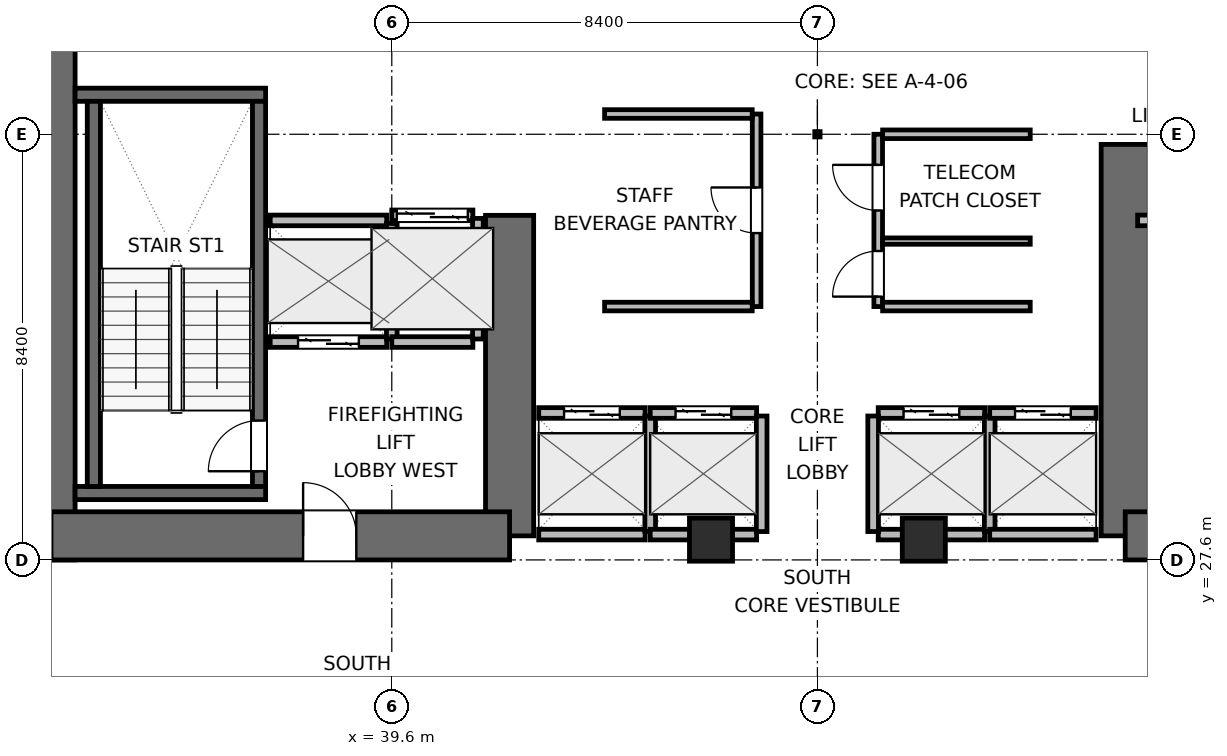
"""IFC4 building model, lengths in metres.
Left out: names, types, materials, properties, quantities, classifications, styles, units other than length and angle.
Written with IfcOpenShell. Run it as: python <this file> out.ifc"""

import sys

from ifc_helpers import new_model, si_unit, direction, frame, frame_2d, origin, origin_2d, place, context, subcontext, project, spatial, rectangle, extrude, element, fill, save


model = new_model("IFC4")
c1 = context("Model", 3, precision=1e-05, world=origin(), true_north=direction((0.0, 1.0)))
c2 = subcontext(c1, "Body", "Model", "MODEL_VIEW")
j1 = project(units=[si_unit("LENGTHUNIT", "METRE"), si_unit("PLANEANGLEUNIT", "RADIAN")], contexts=[c1])
p1 = place(None, origin())
s1 = spatial("IfcSite", under=j1, at=p1, CompositionType="ELEMENT")
p2 = place(p1, origin())
s2 = spatial("IfcBuilding", under=s1, at=p2, CompositionType="ELEMENT")
p3 = place(p2, frame((0.0, 0.0, 85.8)))
s3 = spatial("IfcBuildingStorey", under=s2, at=p3, CompositionType="ELEMENT", Elevation=85.8)
p4 = place(p3, frame((32.875, 27.6, 0.0), z_axis=(0.0, 0.0, 1.0), x_axis=(0.0, 1.0, 0.0)))
e1 = element("IfcWall", 1, at=p4, inside=s3, PredefinedType="SHEAR", context=c2, shape_type="SweptSolid", body=[
    extrude(rectangle(XDim=16.8, YDim=0.95, at=frame_2d((8.4, 0.0))), origin(), (0.0, 0.0, 1.0), 3.9),
])
p5 = place(p3, frame((41.925, 28.075, 0.0), z_axis=(0.0, 0.0, 1.0), x_axis=(0.0, 1.0, 0.0)))
e2 = element("IfcWall", 2, at=p5, inside=s3, PredefinedType="SHEAR", context=c2, shape_type="SweptSolid", body=[
    extrude(rectangle(XDim=6.325, YDim=0.95, at=frame_2d((3.163, 0.0))), origin(), (0.0, 0.0, 1.0), 3.9),
])
p6 = place(p3, frame((32.875, 28.075, 0.0), z_axis=(0.0, 0.0, 1.0), x_axis=(1.0, 0.0, 0.0)))
e3 = element("IfcWall", 3, at=p6, inside=s3, PredefinedType="SHEAR", context=c2, shape_type="SweptSolid", body=[
    extrude(rectangle(XDim=9.05, YDim=0.95, at=frame_2d((4.525, 0.0))), origin(), (0.0, 0.0, 1.0), 3.9),
])
p7 = place(p6, frame((4.975, 0.0, 0.0)))
e4 = element("IfcOpeningElement", 4, at=p7, cuts=e3, PredefinedType="OPENING", context=c2, shape_type="SweptSolid", body=[
    extrude(rectangle(XDim=1.05, YDim=2.04, at=frame_2d((0.525, 1.02))), frame((0.0, 0.485, 0.0), z_axis=(0.0, -1.0, 0.0), x_axis=(1.0, 0.0, 0.0)), (0.0, 0.0, 1.0), 0.97),
])
p8 = place(p3, frame((54.075, 28.075, 0.0), z_axis=(0.0, 0.0, 1.0), x_axis=(0.0, 1.0, 0.0)))
e5 = element("IfcWall", 5, at=p8, inside=s3, PredefinedType="SHEAR", context=c2, shape_type="SweptSolid", body=[
    extrude(rectangle(XDim=7.725, YDim=0.95, at=frame_2d((3.863, 0.0))), origin(), (0.0, 0.0, 1.0), 3.9),
])
p9 = place(p3, frame((54.075, 28.075, 0.0), z_axis=(0.0, 0.0, 1.0), x_axis=(1.0, 0.0, 0.0)))
e6 = element("IfcWall", 6, at=p9, inside=s3, PredefinedType="SHEAR", context=c2, shape_type="SweptSolid", body=[
    extrude(rectangle(XDim=9.05, YDim=0.95, at=frame_2d((4.525, 0.0))), origin(), (0.0, 0.0, 1.0), 3.9),
])
p10 = place(p9, frame((3.925, 0.0, 0.0)))
e7 = element("IfcOpeningElement", 7, at=p10, cuts=e6, PredefinedType="OPENING", context=c2, shape_type="SweptSolid", body=[
    extrude(rectangle(XDim=1.05, YDim=2.04, at=frame_2d((0.525, 1.02))), frame((0.0, 0.485, 0.0), z_axis=(0.0, -1.0, 0.0), x_axis=(1.0, 0.0, 0.0)), (0.0, 0.0, 1.0), 0.97),
])
for number, where, z_axis, x_axis in (
    (8, (33.35, 28.92, 0.0), (0.0, 0.0, 1.0), (1.0, 0.0, 0.0)),
    (9, (33.35, 36.78, 0.0), (0.0, 0.0, 1.0), (1.0, 0.0, 0.0)),
):
    element("IfcWall", number, at=place(p3, frame(where, z_axis=z_axis, x_axis=x_axis)), inside=s3, PredefinedType="SHEAR", context=c2, shape_type="SweptSolid", body=[
        extrude(rectangle(XDim=3.76, YDim=0.26, at=frame_2d((1.88, 0.0))), origin(), (0.0, 0.0, 1.0), 3.9),
    ])
p11 = place(p3, frame((33.72, 29.05, 0.0), z_axis=(0.0, 0.0, 1.0), x_axis=(0.0, 1.0, 0.0)))
e10 = element("IfcWall", 10, at=p11, inside=s3, PredefinedType="SHEAR", context=c2, shape_type="SweptSolid", body=[
    extrude(rectangle(XDim=7.6, YDim=0.26, at=frame_2d((3.8, 0.0))), origin(), (0.0, 0.0, 1.0), 3.9),
])
p12 = place(p3, frame((36.98, 29.05, 0.0), z_axis=(0.0, 0.0, 1.0), x_axis=(0.0, 1.0, 0.0)))
e11 = element("IfcWall", 11, at=p12, inside=s3, PredefinedType="SHEAR", context=c2, shape_type="SweptSolid", body=[
    extrude(rectangle(XDim=7.6, YDim=0.26, at=frame_2d((3.8, 0.0))), origin(), (0.0, 0.0, 1.0), 3.9),
])
p13 = place(p12, frame((0.3, 0.0, 0.0)))
e12 = element("IfcOpeningElement", 12, at=p13, cuts=e11, PredefinedType="OPENING", context=c2, shape_type="SweptSolid", body=[
    extrude(rectangle(XDim=1.0, YDim=2.04, at=frame_2d((0.5, 1.02))), frame((0.0, 0.14, 0.0), z_axis=(0.0, -1.0, 0.0), x_axis=(1.0, 0.0, 0.0)), (0.0, 0.0, 1.0), 0.28),
])
for number, where, z_axis, x_axis in (
    (13, (45.9, 28.0, 0.0), (0.0, 0.0, 1.0), (1.0, 0.0, 0.0)),
    (14, (50.1, 28.0, 0.0), (0.0, 0.0, 1.0), (1.0, 0.0, 0.0)),
):
    element("IfcColumn", number, at=place(p3, frame(where, z_axis=z_axis, x_axis=x_axis)), inside=s3, PredefinedType="COLUMN", context=c2, shape_type="SweptSolid", body=[
        extrude(rectangle(XDim=0.85, YDim=0.85, at=origin_2d()), origin(), (0.0, 0.0, 1.0), 3.9),
    ])
p14 = place(p3, frame((37.2, 31.9, 0.0), z_axis=(0.0, 0.0, 1.0), x_axis=(1.0, 0.0, 0.0)))
e15 = element("IfcWall", 15, at=p14, inside=s3, PredefinedType="PARTITIONING", context=c2, shape_type="SweptSolid", body=[
    extrude(rectangle(XDim=2.3, YDim=0.21, at=frame_2d((1.15, 0.0))), origin(), (0.0, 0.0, 1.0), 3.64),
])
p15 = place(p14, frame((0.55, 0.0, 0.0)))
e16 = element("IfcOpeningElement", 16, at=p15, cuts=e15, PredefinedType="OPENING", context=c2, shape_type="SweptSolid", body=[
    extrude(rectangle(XDim=1.2, YDim=2.04, at=frame_2d((0.6, 1.02))), frame((0.0, 0.115, 0.0), z_axis=(0.0, -1.0, 0.0), x_axis=(1.0, 0.0, 0.0)), (0.0, 0.0, 1.0), 0.23),
])
p16 = place(p3, frame((37.2, 34.3, 0.0), z_axis=(0.0, 0.0, 1.0), x_axis=(1.0, 0.0, 0.0)))
e17 = element("IfcWall", 17, at=p16, inside=s3, PredefinedType="PARTITIONING", context=c2, shape_type="SweptSolid", body=[
    extrude(rectangle(XDim=2.3, YDim=0.21, at=frame_2d((1.15, 0.0))), origin(), (0.0, 0.0, 1.0), 3.64),
])
p17 = place(p3, frame((39.6, 31.96, 0.0), z_axis=(0.0, 0.0, 1.0), x_axis=(0.0, 1.0, 0.0)))
e18 = element("IfcWall", 18, at=p17, inside=s3, PredefinedType="PARTITIONING", context=c2, shape_type="SweptSolid", body=[
    extrude(rectangle(XDim=2.28, YDim=0.21, at=frame_2d((1.14, 0.0))), origin(), (0.0, 0.0, 1.0), 3.64),
])
p18 = place(p3, frame((54.32, 34.3, 0.0), z_axis=(0.0, 0.0, 1.0), x_axis=(1.0, 0.0, 0.0)))
e19 = element("IfcWall", 19, at=p18, inside=s3, PredefinedType="PARTITIONING", context=c2, shape_type="SweptSolid", body=[
    extrude(rectangle(XDim=3.48, YDim=0.21, at=frame_2d((1.74, 0.0))), origin(), (0.0, 0.0, 1.0), 3.64),
])
p19 = place(p3, frame((39.6, 34.4, 0.0), z_axis=(0.0, 0.0, 1.0), x_axis=(1.0, 0.0, 0.0)))
e20 = element("IfcWall", 20, at=p19, inside=s3, PredefinedType="PARTITIONING", context=c2, shape_type="SweptSolid", body=[
    extrude(rectangle(XDim=1.6, YDim=0.21, at=frame_2d((0.8, 0.0))), origin(), (0.0, 0.0, 1.0), 3.64),
])
p20 = place(p19, frame((0.1, 0.0, 0.0)))
e21 = element("IfcOpeningElement", 21, at=p20, cuts=e20, PredefinedType="OPENING", context=c2, shape_type="SweptSolid", body=[
    extrude(rectangle(XDim=1.4, YDim=2.06, at=frame_2d((0.7, 1.03))), frame((0.0, 0.115, 0.0), z_axis=(0.0, -1.0, 0.0), x_axis=(1.0, 0.0, 0.0)), (0.0, 0.0, 1.0), 0.23),
])
p21 = place(p3, frame((39.6, 31.9, 0.0), z_axis=(0.0, 0.0, 1.0), x_axis=(1.0, 0.0, 0.0)))
e22 = element("IfcWall", 22, at=p21, inside=s3, PredefinedType="PARTITIONING", context=c2, shape_type="SweptSolid", body=[
    extrude(rectangle(XDim=1.6, YDim=0.21, at=frame_2d((0.8, 0.0))), origin(), (0.0, 0.0, 1.0), 3.64),
])
p22 = place(p3, frame((41.3, 31.96, 0.0), z_axis=(0.0, 0.0, 1.0), x_axis=(0.0, 1.0, 0.0)))
e23 = element("IfcWall", 23, at=p22, inside=s3, PredefinedType="PARTITIONING", context=c2, shape_type="SweptSolid", body=[
    extrude(rectangle(XDim=2.38, YDim=0.21, at=frame_2d((1.19, 0.0))), origin(), (0.0, 0.0, 1.0), 3.64),
])
p23 = place(p3, frame((42.5, 30.5, 0.0), z_axis=(0.0, 0.0, 1.0), x_axis=(1.0, 0.0, 0.0)))
e24 = element("IfcWall", 24, at=p23, inside=s3, PredefinedType="PARTITIONING", context=c2, shape_type="SweptSolid", body=[
    extrude(rectangle(XDim=2.1, YDim=0.21, at=frame_2d((1.05, 0.0))), origin(), (0.0, 0.0, 1.0), 3.64),
])
p24 = place(p23, frame((0.5, 0.0, 0.0)))
e25 = element("IfcOpeningElement", 25, at=p24, cuts=e24, PredefinedType="OPENING", context=c2, shape_type="SweptSolid", body=[
    extrude(rectangle(XDim=1.1, YDim=2.04, at=frame_2d((0.55, 1.02))), frame((0.0, 0.115, 0.0), z_axis=(0.0, -1.0, 0.0), x_axis=(1.0, 0.0, 0.0)), (0.0, 0.0, 1.0), 0.23),
])
p25 = place(p3, frame((42.5, 28.1, 0.0), z_axis=(0.0, 0.0, 1.0), x_axis=(1.0, 0.0, 0.0)))
e26 = element("IfcWall", 26, at=p25, inside=s3, PredefinedType="PARTITIONING", context=c2, shape_type="SweptSolid", body=[
    extrude(rectangle(XDim=2.1, YDim=0.21, at=frame_2d((1.05, 0.0))), origin(), (0.0, 0.0, 1.0), 2.525),
])
p26 = place(p3, frame((44.7, 28.16, 0.0), z_axis=(0.0, 0.0, 1.0), x_axis=(0.0, 1.0, 0.0)))
e27 = element("IfcWall", 27, at=p26, inside=s3, PredefinedType="PARTITIONING", context=c2, shape_type="SweptSolid", body=[
    extrude(rectangle(XDim=2.28, YDim=0.21, at=frame_2d((1.14, 0.0))), origin(), (0.0, 0.0, 1.0), 3.64),
])
p27 = place(p3, frame((44.7, 30.5, 0.0), z_axis=(0.0, 0.0, 1.0), x_axis=(1.0, 0.0, 0.0)))
e28 = element("IfcWall", 28, at=p27, inside=s3, PredefinedType="PARTITIONING", context=c2, shape_type="SweptSolid", body=[
    extrude(rectangle(XDim=2.1, YDim=0.21, at=frame_2d((1.05, 0.0))), origin(), (0.0, 0.0, 1.0), 3.64),
])
p28 = place(p27, frame((0.5, 0.0, 0.0)))
e29 = element("IfcOpeningElement", 29, at=p28, cuts=e28, PredefinedType="OPENING", context=c2, shape_type="SweptSolid", body=[
    extrude(rectangle(XDim=1.1, YDim=2.04, at=frame_2d((0.55, 1.02))), frame((0.0, 0.115, 0.0), z_axis=(0.0, -1.0, 0.0), x_axis=(1.0, 0.0, 0.0)), (0.0, 0.0, 1.0), 0.23),
])
p29 = place(p3, frame((44.7, 28.1, 0.0), z_axis=(0.0, 0.0, 1.0), x_axis=(1.0, 0.0, 0.0)))
e30 = element("IfcWall", 30, at=p29, inside=s3, PredefinedType="PARTITIONING", context=c2, shape_type="SweptSolid", body=[
    extrude(rectangle(XDim=2.1, YDim=0.21, at=frame_2d((1.05, 0.0))), origin(), (0.0, 0.0, 1.0), 2.525),
])
p30 = place(p3, frame((46.9, 28.16, 0.0), z_axis=(0.0, 0.0, 1.0), x_axis=(0.0, 1.0, 0.0)))
e31 = element("IfcWall", 31, at=p30, inside=s3, PredefinedType="PARTITIONING", context=c2, shape_type="SweptSolid", body=[
    extrude(rectangle(XDim=2.28, YDim=0.21, at=frame_2d((1.14, 0.0))), origin(), (0.0, 0.0, 1.0), 3.64),
])
p31 = place(p3, frame((49.2, 30.5, 0.0), z_axis=(0.0, 0.0, 1.0), x_axis=(1.0, 0.0, 0.0)))
e32 = element("IfcWall", 32, at=p31, inside=s3, PredefinedType="PARTITIONING", context=c2, shape_type="SweptSolid", body=[
    extrude(rectangle(XDim=2.1, YDim=0.21, at=frame_2d((1.05, 0.0))), origin(), (0.0, 0.0, 1.0), 3.64),
])
p32 = place(p31, frame((0.5, 0.0, 0.0)))
e33 = element("IfcOpeningElement", 33, at=p32, cuts=e32, PredefinedType="OPENING", context=c2, shape_type="SweptSolid", body=[
    extrude(rectangle(XDim=1.1, YDim=2.04, at=frame_2d((0.55, 1.02))), frame((0.0, 0.115, 0.0), z_axis=(0.0, -1.0, 0.0), x_axis=(1.0, 0.0, 0.0)), (0.0, 0.0, 1.0), 0.23),
])
p33 = place(p3, frame((49.2, 28.1, 0.0), z_axis=(0.0, 0.0, 1.0), x_axis=(1.0, 0.0, 0.0)))
e34 = element("IfcWall", 34, at=p33, inside=s3, PredefinedType="PARTITIONING", context=c2, shape_type="SweptSolid", body=[
    extrude(rectangle(XDim=2.1, YDim=0.21, at=frame_2d((1.05, 0.0))), origin(), (0.0, 0.0, 1.0), 2.525),
])
for number, where, z_axis, x_axis in (
    (35, (49.1, 28.16, 0.0), (0.0, 0.0, 1.0), (0.0, 1.0, 0.0)),
    (36, (51.4, 28.16, 0.0), (0.0, 0.0, 1.0), (0.0, 1.0, 0.0)),
):
    element("IfcWall", number, at=place(p3, frame(where, z_axis=z_axis, x_axis=x_axis)), inside=s3, PredefinedType="PARTITIONING", context=c2, shape_type="SweptSolid", body=[
        extrude(rectangle(XDim=2.28, YDim=0.21, at=frame_2d((1.14, 0.0))), origin(), (0.0, 0.0, 1.0), 3.64),
    ])
p34 = place(p3, frame((51.4, 30.5, 0.0), z_axis=(0.0, 0.0, 1.0), x_axis=(1.0, 0.0, 0.0)))
e37 = element("IfcWall", 37, at=p34, inside=s3, PredefinedType="PARTITIONING", context=c2, shape_type="SweptSolid", body=[
    extrude(rectangle(XDim=2.1, YDim=0.21, at=frame_2d((1.05, 0.0))), origin(), (0.0, 0.0, 1.0), 3.64),
])
p35 = place(p34, frame((0.5, 0.0, 0.0)))
e38 = element("IfcOpeningElement", 38, at=p35, cuts=e37, PredefinedType="OPENING", context=c2, shape_type="SweptSolid", body=[
    extrude(rectangle(XDim=1.1, YDim=2.04, at=frame_2d((0.55, 1.02))), frame((0.0, 0.115, 0.0), z_axis=(0.0, -1.0, 0.0), x_axis=(1.0, 0.0, 0.0)), (0.0, 0.0, 1.0), 0.23),
])
p36 = place(p3, frame((51.4, 28.1, 0.0), z_axis=(0.0, 0.0, 1.0), x_axis=(1.0, 0.0, 0.0)))
e39 = element("IfcWall", 39, at=p36, inside=s3, PredefinedType="PARTITIONING", context=c2, shape_type="SweptSolid", body=[
    extrude(rectangle(XDim=2.1, YDim=0.21, at=frame_2d((1.05, 0.0))), origin(), (0.0, 0.0, 1.0), 2.525),
])
p37 = place(p3, frame((46.8, 32.6, 0.0), z_axis=(0.0, 0.0, 1.0), x_axis=(0.0, 1.0, 0.0)))
e40 = element("IfcWall", 40, at=p37, inside=s3, PredefinedType="PARTITIONING", context=c2, shape_type="SweptSolid", body=[
    extrude(rectangle(XDim=3.8, YDim=0.17, at=frame_2d((1.9, 0.0))), origin(), (0.0, 0.0, 1.0), 3.64),
])
p38 = place(p37, frame((1.45, 0.0, 0.0)))
e41 = element("IfcOpeningElement", 41, at=p38, cuts=e40, PredefinedType="OPENING", context=c2, shape_type="SweptSolid", body=[
    extrude(rectangle(XDim=0.9, YDim=2.02, at=frame_2d((0.45, 1.01))), frame((0.0, 0.095, 0.0), z_axis=(0.0, -1.0, 0.0), x_axis=(1.0, 0.0, 0.0)), (0.0, 0.0, 1.0), 0.19),
])
for number, where, z_axis, x_axis in (
    (42, (43.8, 32.6, 0.0), (0.0, 0.0, 1.0), (1.0, 0.0, 0.0)),
    (43, (43.8, 36.4, 0.0), (0.0, 0.0, 1.0), (1.0, 0.0, 0.0)),
):
    element("IfcWall", number, at=place(p3, frame(where, z_axis=z_axis, x_axis=x_axis)), inside=s3, PredefinedType="PARTITIONING", context=c2, shape_type="SweptSolid", body=[
        extrude(rectangle(XDim=2.913, YDim=0.17, at=frame_2d((1.457, 0.0))), origin(), (0.0, 0.0, 1.0), 3.64),
    ])
p39 = place(p3, frame((49.2, 32.6, 0.0), z_axis=(0.0, 0.0, 1.0), x_axis=(0.0, 1.0, 0.0)))
e44 = element("IfcWall", 44, at=p39, inside=s3, PredefinedType="PARTITIONING", context=c2, shape_type="SweptSolid", body=[
    extrude(rectangle(XDim=3.4, YDim=0.17, at=frame_2d((1.7, 0.0))), origin(), (0.0, 0.0, 1.0), 3.64),
])
p40 = place(p39, frame((0.196, 0.0, 0.0)))
e45 = element("IfcOpeningElement", 45, at=p40, cuts=e44, PredefinedType="OPENING", context=c2, shape_type="SweptSolid", body=[
    extrude(rectangle(XDim=0.9, YDim=2.02, at=frame_2d((0.45, 1.01))), frame((0.0, 0.095, 0.0), z_axis=(0.0, -1.0, 0.0), x_axis=(1.0, 0.0, 0.0)), (0.0, 0.0, 1.0), 0.19),
])
p41 = place(p39, frame((1.896, 0.0, 0.0)))
e46 = element("IfcOpeningElement", 46, at=p41, cuts=e44, PredefinedType="OPENING", context=c2, shape_type="SweptSolid", body=[
    extrude(rectangle(XDim=0.9, YDim=2.02, at=frame_2d((0.45, 1.01))), frame((0.0, 0.095, 0.0), z_axis=(0.0, -1.0, 0.0), x_axis=(1.0, 0.0, 0.0)), (0.0, 0.0, 1.0), 0.19),
])
for number, where, z_axis, x_axis in (
    (47, (49.287, 32.6, 0.0), (0.0, 0.0, 1.0), (1.0, 0.0, 0.0)),
    (48, (49.287, 36.0, 0.0), (0.0, 0.0, 1.0), (1.0, 0.0, 0.0)),
):
    element("IfcWall", number, at=place(p3, frame(where, z_axis=z_axis, x_axis=x_axis)), inside=s3, PredefinedType="PARTITIONING", context=c2, shape_type="SweptSolid", body=[
        extrude(rectangle(XDim=2.913, YDim=0.17, at=frame_2d((1.457, 0.0))), origin(), (0.0, 0.0, 1.0), 3.64),
    ])
p42 = place(p3, frame((49.287, 33.892, 0.0), z_axis=(0.0, 0.0, 1.0), x_axis=(1.0, 0.0, 0.0)))
e49 = element("IfcWall", 49, at=p42, inside=s3, PredefinedType="PARTITIONING", context=c2, shape_type="SweptSolid", body=[
    extrude(rectangle(XDim=2.913, YDim=0.125, at=frame_2d((1.457, 0.0))), origin(), (0.0, 0.0, 1.0), 3.64),
])
p43 = place(p13, origin())
e50 = element("IfcDoor", 50, at=p43, inside=s3, OperationType="SINGLE_SWING_LEFT", PredefinedType="DOOR", context=c2, shape_type="SweptSolid", body=[
    extrude(rectangle(XDim=1.0, YDim=2.04, at=frame_2d((0.5, 1.02))), frame((0.0, 0.025, 0.0), z_axis=(0.0, -1.0, 0.0), x_axis=(1.0, 0.0, 0.0)), (0.0, 0.0, 1.0), 0.05),
])
fill(e12, e50)
p44 = place(p15, origin())
e51 = element("IfcDoor", 51, at=p44, inside=s3, OperationType="DOUBLE_DOOR_SLIDING", PredefinedType="DOOR", context=c2, shape_type="SweptSolid", body=[
    extrude(rectangle(XDim=1.2, YDim=2.04, at=frame_2d((0.6, 1.02))), frame((0.0, 0.025, 0.0), z_axis=(0.0, -1.0, 0.0), x_axis=(1.0, 0.0, 0.0)), (0.0, 0.0, 1.0), 0.05),
])
fill(e16, e51)
p45 = place(p20, origin())
e52 = element("IfcDoor", 52, at=p45, inside=s3, OperationType="DOUBLE_DOOR_SLIDING", PredefinedType="DOOR", context=c2, shape_type="SweptSolid", body=[
    extrude(rectangle(XDim=1.4, YDim=2.06, at=frame_2d((0.7, 1.03))), frame((0.0, 0.025, 0.0), z_axis=(0.0, -1.0, 0.0), x_axis=(1.0, 0.0, 0.0)), (0.0, 0.0, 1.0), 0.05),
])
fill(e21, e52)
p46 = place(p24, origin())
e53 = element("IfcDoor", 53, at=p46, inside=s3, OperationType="DOUBLE_DOOR_SLIDING", PredefinedType="DOOR", context=c2, shape_type="SweptSolid", body=[
    extrude(rectangle(XDim=1.1, YDim=2.04, at=frame_2d((0.55, 1.02))), frame((0.0, 0.025, 0.0), z_axis=(0.0, -1.0, 0.0), x_axis=(1.0, 0.0, 0.0)), (0.0, 0.0, 1.0), 0.05),
])
fill(e25, e53)
p47 = place(p28, origin())
e54 = element("IfcDoor", 54, at=p47, inside=s3, OperationType="DOUBLE_DOOR_SLIDING", PredefinedType="DOOR", context=c2, shape_type="SweptSolid", body=[
    extrude(rectangle(XDim=1.1, YDim=2.04, at=frame_2d((0.55, 1.02))), frame((0.0, 0.025, 0.0), z_axis=(0.0, -1.0, 0.0), x_axis=(1.0, 0.0, 0.0)), (0.0, 0.0, 1.0), 0.05),
])
fill(e29, e54)
p48 = place(p32, origin())
e55 = element("IfcDoor", 55, at=p48, inside=s3, OperationType="DOUBLE_DOOR_SLIDING", PredefinedType="DOOR", context=c2, shape_type="SweptSolid", body=[
    extrude(rectangle(XDim=1.1, YDim=2.04, at=frame_2d((0.55, 1.02))), frame((0.0, 0.025, 0.0), z_axis=(0.0, -1.0, 0.0), x_axis=(1.0, 0.0, 0.0)), (0.0, 0.0, 1.0), 0.05),
])
fill(e33, e55)
p49 = place(p35, origin())
e56 = element("IfcDoor", 56, at=p49, inside=s3, OperationType="DOUBLE_DOOR_SLIDING", PredefinedType="DOOR", context=c2, shape_type="SweptSolid", body=[
    extrude(rectangle(XDim=1.1, YDim=2.04, at=frame_2d((0.55, 1.02))), frame((0.0, 0.025, 0.0), z_axis=(0.0, -1.0, 0.0), x_axis=(1.0, 0.0, 0.0)), (0.0, 0.0, 1.0), 0.05),
])
fill(e38, e56)
p50 = place(p7, origin())
e57 = element("IfcDoor", 57, at=p50, inside=s3, OperationType="SINGLE_SWING_LEFT", PredefinedType="DOOR", context=c2, shape_type="SweptSolid", body=[
    extrude(rectangle(XDim=1.05, YDim=2.04, at=frame_2d((0.525, 1.02))), frame((0.0, 0.025, 0.0), z_axis=(0.0, -1.0, 0.0), x_axis=(1.0, 0.0, 0.0)), (0.0, 0.0, 1.0), 0.05),
])
fill(e4, e57)
p51 = place(p38, origin())
e58 = element("IfcDoor", 58, at=p51, inside=s3, OperationType="SINGLE_SWING_RIGHT", PredefinedType="DOOR", context=c2, shape_type="SweptSolid", body=[
    extrude(rectangle(XDim=0.9, YDim=2.02, at=frame_2d((0.45, 1.01))), frame((0.0, 0.025, 0.0), z_axis=(0.0, -1.0, 0.0), x_axis=(1.0, 0.0, 0.0)), (0.0, 0.0, 1.0), 0.05),
])
fill(e41, e58)
p52 = place(p40, origin())
e59 = element("IfcDoor", 59, at=p52, inside=s3, OperationType="SINGLE_SWING_LEFT", PredefinedType="DOOR", context=c2, shape_type="SweptSolid", body=[
    extrude(rectangle(XDim=0.9, YDim=2.02, at=frame_2d((0.45, 1.01))), frame((0.0, 0.025, 0.0), z_axis=(0.0, -1.0, 0.0), x_axis=(1.0, 0.0, 0.0)), (0.0, 0.0, 1.0), 0.05),
])
fill(e45, e59)
p53 = place(p41, origin())
e60 = element("IfcDoor", 60, at=p53, inside=s3, OperationType="SINGLE_SWING_RIGHT", PredefinedType="DOOR", context=c2, shape_type="SweptSolid", body=[
    extrude(rectangle(XDim=0.9, YDim=2.02, at=frame_2d((0.45, 1.01))), frame((0.0, 0.025, 0.0), z_axis=(0.0, -1.0, 0.0), x_axis=(1.0, 0.0, 0.0)), (0.0, 0.0, 1.0), 0.05),
])
fill(e46, e60)
save(model, sys.argv[1])
